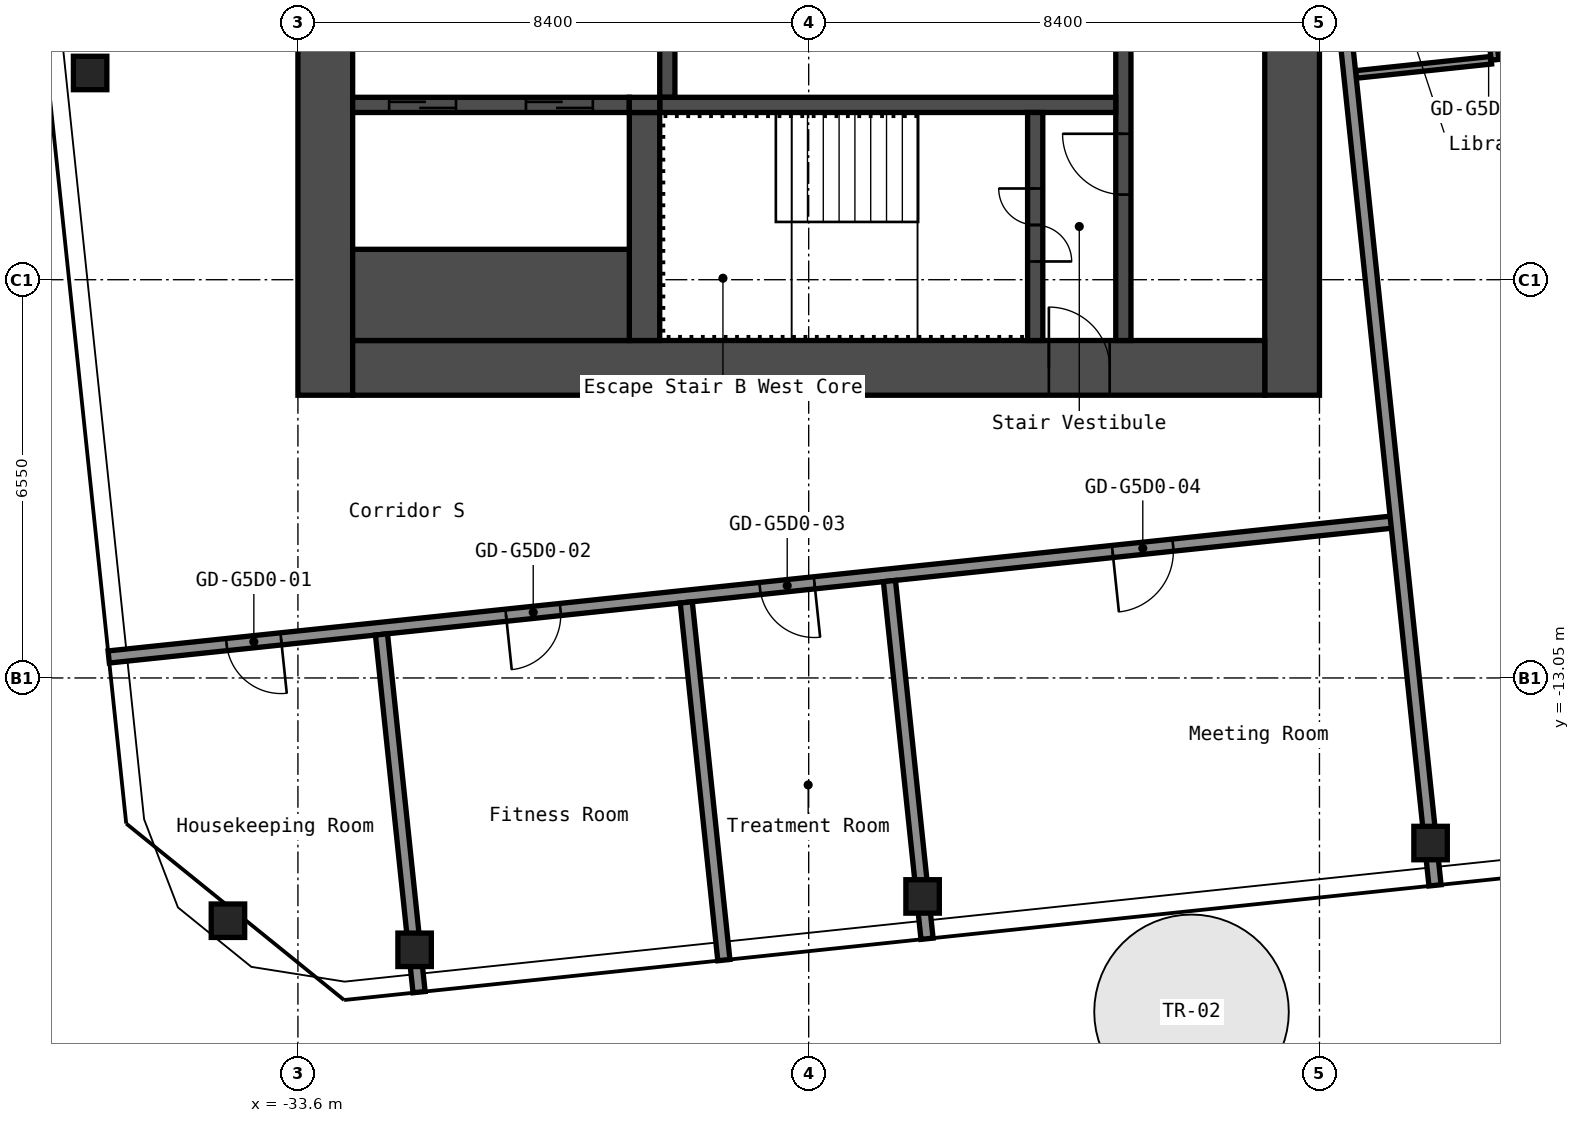
"""IFC4 building model, lengths in metres.
Left out: names, types, materials, properties, quantities, classifications, styles, units other than length and angle.
Written with IfcOpenShell. Run it as: python <this file> out.ifc"""

import sys

from ifc_helpers import new_model, si_unit, direction, frame, frame_2d, origin, origin_2d, place, context, subcontext, project, spatial, rectangle, hollow_rectangle, extrude, element, fill, save


model = new_model("IFC4")
c1 = context("Model", 3, precision=1e-05, world=origin(), true_north=direction((0.0, 1.0)))
c2 = subcontext(c1, "Body", "Model", "MODEL_VIEW")
j1 = project(units=[si_unit("LENGTHUNIT", "METRE"), si_unit("PLANEANGLEUNIT", "RADIAN")], contexts=[c1])
p1 = place(None, origin())
s1 = spatial("IfcSite", under=j1, at=p1, CompositionType="ELEMENT")
p2 = place(p1, origin())
s2 = spatial("IfcBuilding", under=s1, at=p2, CompositionType="ELEMENT")
p3 = place(p2, frame((0.0, 0.0, 248.6)))
s3 = spatial("IfcBuildingStorey", under=s2, at=p3, CompositionType="ELEMENT", Elevation=248.6)
for number, where, z_axis, x_axis in (
    (1, (-34.751, -17.042, 0.0), (0.0, 0.0, 1.0), (1.0, 0.0, 0.0)),
    (2, (-37.017, -3.1, 0.0), (0.0, 0.0, 1.0), (1.0, 0.0, 0.0)),
    (3, (-31.681, -17.521, 0.0), (0.0, 0.0, 1.0), (1.0, 0.0, 0.0)),
    (4, (-23.327, -16.643, 0.0), (0.0, 0.0, 1.0), (1.0, 0.0, 0.0)),
    (5, (-14.973, -15.765, 0.0), (0.0, 0.0, 1.0), (1.0, 0.0, 0.0)),
):
    element("IfcColumn", number, at=place(p3, frame(where, z_axis=z_axis, x_axis=x_axis)), inside=s3, PredefinedType="COLUMN", context=c2, shape_type="SweptSolid", body=[
        extrude(hollow_rectangle(XDim=0.55, YDim=0.55, WallThickness=0.022, InnerFilletRadius=0.033, OuterFilletRadius=0.055, at=origin_2d()), origin(), (0.0, 0.0, 1.0), 2.75),
    ])
p4 = place(p3, frame((-17.25, -8.4, 0.0), z_axis=(0.0, 0.0, 1.0), x_axis=(0.0, 1.0, 0.0)))
e6 = element("IfcWall", 6, at=p4, inside=s3, PredefinedType="SHEAR", context=c2, shape_type="SweptSolid", body=[
    extrude(rectangle(XDim=16.8, YDim=0.9, at=frame_2d((8.4, 0.0))), origin(), (0.0, 0.0, 1.0), 2.75),
])
p5 = place(p4, frame((8.321, 0.0, 0.0)))
e7 = element("IfcOpeningElement", 7, at=p5, cuts=e6, PredefinedType="OPENING", context=c2, shape_type="SweptSolid", body=[
    extrude(rectangle(XDim=1.6, YDim=2.1, at=frame_2d((0.8, 1.05))), frame((0.0, 0.46, 0.0), z_axis=(0.0, -1.0, 0.0), x_axis=(1.0, 0.0, 0.0)), (0.0, 0.0, 1.0), 0.92),
])
p6 = place(p3, frame((-33.15, -8.4, 0.0), z_axis=(0.0, 0.0, 1.0), x_axis=(0.0, 1.0, 0.0)))
e8 = element("IfcWall", 8, at=p6, inside=s3, PredefinedType="SHEAR", context=c2, shape_type="SweptSolid", body=[
    extrude(rectangle(XDim=16.8, YDim=0.9, at=frame_2d((8.4, 0.0))), origin(), (0.0, 0.0, 1.0), 2.75),
])
p7 = place(p3, frame((-32.7, -7.95, 0.0), z_axis=(0.0, 0.0, 1.0), x_axis=(1.0, 0.0, 0.0)))
e9 = element("IfcWall", 9, at=p7, inside=s3, PredefinedType="SHEAR", context=c2, shape_type="SweptSolid", body=[
    extrude(rectangle(XDim=15.0, YDim=0.9, at=frame_2d((7.5, 0.0))), origin(), (0.0, 0.0, 1.0), 2.75),
])
p8 = place(p7, frame((11.45, 0.0, 0.0)))
e10 = element("IfcOpeningElement", 10, at=p8, cuts=e9, PredefinedType="OPENING", context=c2, shape_type="SweptSolid", body=[
    extrude(rectangle(XDim=1.0, YDim=2.1, at=frame_2d((0.5, 1.05))), frame((0.0, 0.46, 0.0), z_axis=(0.0, -1.0, 0.0), x_axis=(1.0, 0.0, 0.0)), (0.0, 0.0, 1.0), 0.92),
])
p9 = place(p3, frame((-20.025, -7.5, 0.0), z_axis=(0.0, 0.0, 1.0), x_axis=(0.0, 1.0, 0.0)))
e11 = element("IfcWall", 11, at=p9, inside=s3, PredefinedType="SHEAR", context=c2, shape_type="SweptSolid", body=[
    extrude(rectangle(XDim=6.3, YDim=0.25, at=frame_2d((3.15, 0.0))), origin(), (0.0, 0.0, 1.0), 2.75),
])
p10 = place(p9, frame((2.4, 0.0, 0.0)))
e12 = element("IfcOpeningElement", 12, at=p10, cuts=e11, PredefinedType="OPENING", context=c2, shape_type="SweptSolid", body=[
    extrude(rectangle(XDim=1.0, YDim=2.1, at=frame_2d((0.5, 1.05))), frame((0.0, 0.135, 0.0), z_axis=(0.0, -1.0, 0.0), x_axis=(1.0, 0.0, 0.0)), (0.0, 0.0, 1.0), 0.27),
])
p11 = place(p3, frame((-27.525, -3.5, 0.0), z_axis=(0.0, 0.0, 1.0), x_axis=(0.0, 1.0, 0.0)))
e13 = element("IfcWall", 13, at=p11, inside=s3, PredefinedType="SHEAR", context=c2, shape_type="SweptSolid", body=[
    extrude(rectangle(XDim=2.05, YDim=0.25, at=frame_2d((1.025, 0.0))), origin(), (0.0, 0.0, 1.0), 2.75),
])
p12 = place(p3, frame((-27.65, -3.625, 0.0), z_axis=(0.0, 0.0, 1.0), x_axis=(1.0, 0.0, 0.0)))
e14 = element("IfcWall", 14, at=p12, inside=s3, PredefinedType="SHEAR", context=c2, shape_type="SweptSolid", body=[
    extrude(rectangle(XDim=7.5, YDim=0.25, at=frame_2d((3.75, 0.0))), origin(), (0.0, 0.0, 1.0), 2.75),
])
p13 = place(p3, frame((-21.475, -7.5, 0.0), z_axis=(0.0, 0.0, 1.0), x_axis=(0.0, 1.0, 0.0)))
e15 = element("IfcWall", 15, at=p13, inside=s3, PredefinedType="SHEAR", context=c2, shape_type="SweptSolid", body=[
    extrude(rectangle(XDim=3.75, YDim=0.25, at=frame_2d((1.875, 0.0))), origin(), (0.0, 0.0, 1.0), 2.75),
])
p14 = place(p13, frame((1.3, 0.0, 0.0)))
e16 = element("IfcOpeningElement", 16, at=p14, cuts=e15, PredefinedType="OPENING", context=c2, shape_type="SweptSolid", body=[
    extrude(rectangle(XDim=1.2, YDim=2.1, at=frame_2d((0.6, 1.05))), frame((0.0, 0.135, 0.0), z_axis=(0.0, -1.0, 0.0), x_axis=(1.0, 0.0, 0.0)), (0.0, 0.0, 1.0), 0.27),
])
p15 = place(p3, frame((-27.9, -7.5, 0.0), z_axis=(0.0, 0.0, 1.0), x_axis=(0.0, 1.0, 0.0)))
e17 = element("IfcWall", 17, at=p15, inside=s3, PredefinedType="SHEAR", context=c2, shape_type="SweptSolid", body=[
    extrude(rectangle(XDim=3.75, YDim=0.5, at=frame_2d((1.875, 0.0))), origin(), (0.0, 0.0, 1.0), 2.75),
])
p16 = place(p3, frame((-32.7, -3.625, 0.0), z_axis=(0.0, 0.0, 1.0), x_axis=(1.0, 0.0, 0.0)))
e18 = element("IfcWall", 18, at=p16, inside=s3, PredefinedType="SHEAR", context=c2, shape_type="SweptSolid", body=[
    extrude(rectangle(XDim=4.55, YDim=0.25, at=frame_2d((2.275, 0.0))), origin(), (0.0, 0.0, 1.0), 2.75),
])
p17 = place(p16, frame((2.85, 0.0, 0.0)))
e19 = element("IfcOpeningElement", 19, at=p17, cuts=e18, PredefinedType="OPENING", context=c2, shape_type="SweptSolid", body=[
    extrude(rectangle(XDim=1.1, YDim=2.1, at=frame_2d((0.55, 1.05))), frame((0.0, 0.135, 0.0), z_axis=(0.0, -1.0, 0.0), x_axis=(1.0, 0.0, 0.0)), (0.0, 0.0, 1.0), 0.27),
])
p18 = place(p16, frame((0.6, 0.0, 0.0)))
e20 = element("IfcOpeningElement", 20, at=p18, cuts=e18, PredefinedType="OPENING", context=c2, shape_type="SweptSolid", body=[
    extrude(rectangle(XDim=1.1, YDim=2.1, at=frame_2d((0.55, 1.05))), frame((0.0, 0.135, 0.0), z_axis=(0.0, -1.0, 0.0), x_axis=(1.0, 0.0, 0.0)), (0.0, 0.0, 1.0), 0.27),
])
p19 = place(p3, frame((-32.7, -6.75, 0.0), z_axis=(0.0, 0.0, 1.0), x_axis=(1.0, 0.0, 0.0)))
e21 = element("IfcWall", 21, at=p19, inside=s3, PredefinedType="SHEAR", context=c2, shape_type="SweptSolid", body=[
    extrude(rectangle(XDim=4.55, YDim=1.5, at=frame_2d((2.275, 0.0))), origin(), (0.0, 0.0, 1.0), 2.75),
])
p20 = place(p3, frame((-28.15, -3.625, 0.0), z_axis=(0.0, 0.0, 1.0), x_axis=(1.0, 0.0, 0.0)))
e22 = element("IfcWall", 22, at=p20, inside=s3, PredefinedType="SHEAR", context=c2, shape_type="SweptSolid", body=[
    extrude(rectangle(XDim=0.5, YDim=0.25, at=frame_2d((0.25, 0.0))), origin(), (0.0, 0.0, 1.0), 2.75),
])
p21 = place(p3, frame((-36.712, -12.705, 0.0), z_axis=(0.0, 0.0, 1.0), x_axis=(0.994522460242, 0.104523088709, 0.0)))
e23 = element("IfcWall", 23, at=p21, inside=s3, PredefinedType="PARTITIONING", context=c2, shape_type="SweptSolid", body=[
    extrude(rectangle(XDim=21.3, YDim=0.2, at=frame_2d((10.65, 0.0))), origin(), (0.0, 0.0, 1.0), 2.75),
])
p22 = place(p21, frame((1.95, 0.0, 0.0)))
e24 = element("IfcOpeningElement", 24, at=p22, cuts=e23, PredefinedType="OPENING", context=c2, shape_type="SweptSolid", body=[
    extrude(rectangle(XDim=0.9, YDim=2.1, at=frame_2d((0.45, 1.05))), frame((0.0, 0.11, 0.0), z_axis=(0.0, -1.0, 0.0), x_axis=(1.0, 0.0, 0.0)), (0.0, 0.0, 1.0), 0.22),
])
p23 = place(p21, frame((6.57, 0.0, 0.0)))
e25 = element("IfcOpeningElement", 25, at=p23, cuts=e23, PredefinedType="OPENING", context=c2, shape_type="SweptSolid", body=[
    extrude(rectangle(XDim=0.9, YDim=2.1, at=frame_2d((0.45, 1.05))), frame((0.0, 0.11, 0.0), z_axis=(0.0, -1.0, 0.0), x_axis=(1.0, 0.0, 0.0)), (0.0, 0.0, 1.0), 0.22),
])
p24 = place(p21, frame((10.77, 0.0, 0.0)))
e26 = element("IfcOpeningElement", 26, at=p24, cuts=e23, PredefinedType="OPENING", context=c2, shape_type="SweptSolid", body=[
    extrude(rectangle(XDim=0.9, YDim=2.1, at=frame_2d((0.45, 1.05))), frame((0.0, 0.11, 0.0), z_axis=(0.0, -1.0, 0.0), x_axis=(1.0, 0.0, 0.0)), (0.0, 0.0, 1.0), 0.22),
])
p25 = place(p21, frame((16.6, 0.0, 0.0)))
e27 = element("IfcOpeningElement", 27, at=p25, cuts=e23, PredefinedType="OPENING", context=c2, shape_type="SweptSolid", body=[
    extrude(rectangle(XDim=1.0, YDim=2.1, at=frame_2d((0.5, 1.05))), frame((0.0, 0.11, 0.0), z_axis=(0.0, -1.0, 0.0), x_axis=(1.0, 0.0, 0.0)), (0.0, 0.0, 1.0), 0.22),
])
p26 = place(p3, frame((-16.201, -3.124, 0.0), z_axis=(0.0, 0.0, 1.0), x_axis=(0.99452218011, 0.104525754092, 0.0)))
e28 = element("IfcWall", 28, at=p26, inside=s3, PredefinedType="PARTITIONING", context=c2, shape_type="SweptSolid", body=[
    extrude(rectangle(XDim=2.238, YDim=0.125, at=frame_2d((1.119, 0.0))), origin(), (0.0, 0.0, 1.0), 2.75),
])
p27 = place(p3, frame((-31.608, -18.217, 0.0), z_axis=(0.0, 0.0, 1.0), x_axis=(-0.10453655107, 0.994521045273, 0.0)))
e29 = element("IfcWall", 29, at=p27, inside=s3, PredefinedType="PARTITIONING", context=c2, shape_type="SweptSolid", body=[
    extrude(rectangle(XDim=5.916, YDim=0.2, at=frame_2d((2.958, 0.0))), origin(), (0.0, 0.0, 1.0), 2.75),
])
p28 = place(p3, frame((-26.595, -17.691, 0.0), z_axis=(0.0, 0.0, 1.0), x_axis=(-0.104532260673, 0.994521496238, 0.0)))
e30 = element("IfcWall", 30, at=p28, inside=s3, PredefinedType="PARTITIONING", context=c2, shape_type="SweptSolid", body=[
    extrude(rectangle(XDim=5.916, YDim=0.2, at=frame_2d((2.958, 0.0))), origin(), (0.0, 0.0, 1.0), 2.75),
])
p29 = place(p3, frame((-23.254, -17.339, 0.0), z_axis=(0.0, 0.0, 1.0), x_axis=(-0.10453655107, 0.994521045273, 0.0)))
e31 = element("IfcWall", 31, at=p29, inside=s3, PredefinedType="PARTITIONING", context=c2, shape_type="SweptSolid", body=[
    extrude(rectangle(XDim=5.916, YDim=0.2, at=frame_2d((2.958, 0.0))), origin(), (0.0, 0.0, 1.0), 2.75),
])
p30 = place(p3, frame((-14.9, -16.461, 0.0), z_axis=(0.0, 0.0, 1.0), x_axis=(-0.104523729364, 0.99452239291, 0.0)))
e32 = element("IfcWall", 32, at=p30, inside=s3, PredefinedType="PARTITIONING", context=c2, shape_type="SweptSolid", body=[
    extrude(rectangle(XDim=15.308, YDim=0.2, at=frame_2d((7.654, 0.0))), origin(), (0.0, 0.0, 1.0), 2.75),
])
p31 = place(p3, frame((-13.914, -2.884, 0.0), z_axis=(0.0, 0.0, 1.0), x_axis=(-0.104491611519, 0.994525767953, 0.0)))
e33 = element("IfcWall", 33, at=p31, inside=s3, PredefinedType="PARTITIONING", context=c2, shape_type="SweptSolid", body=[
    extrude(rectangle(XDim=2.5, YDim=0.125, at=frame_2d((1.25, 0.0))), origin(), (0.0, 0.0, 1.0), 2.75),
])
p32 = place(p31, frame((0.55, 0.0, 0.0)))
e34 = element("IfcOpeningElement", 34, at=p32, cuts=e33, PredefinedType="OPENING", context=c2, shape_type="SweptSolid", body=[
    extrude(rectangle(XDim=0.9, YDim=2.1, at=frame_2d((0.45, 1.05))), frame((0.0, 0.073, 0.0), z_axis=(0.0, -1.0, 0.0), x_axis=(1.0, 0.0, 0.0)), (0.0, 0.0, 1.0), 0.145),
])
p33 = place(p8, origin())
e35 = element("IfcDoor", 35, at=p33, inside=s3, OperationType="SINGLE_SWING_RIGHT", PredefinedType="DOOR", context=c2, shape_type="SweptSolid", body=[
    extrude(rectangle(XDim=1.0, YDim=2.1, at=frame_2d((0.5, 1.05))), frame((0.0, 0.025, 0.0), z_axis=(0.0, -1.0, 0.0), x_axis=(1.0, 0.0, 0.0)), (0.0, 0.0, 1.0), 0.05),
])
fill(e10, e35)
p34 = place(p14, origin())
e36 = element("IfcDoor", 36, at=p34, inside=s3, OperationType="DOUBLE_DOOR_SINGLE_SWING", PredefinedType="DOOR", context=c2, shape_type="SweptSolid", body=[
    extrude(rectangle(XDim=1.2, YDim=2.1, at=frame_2d((0.6, 1.05))), frame((0.0, 0.025, 0.0), z_axis=(0.0, -1.0, 0.0), x_axis=(1.0, 0.0, 0.0)), (0.0, 0.0, 1.0), 0.05),
])
fill(e16, e36)
p35 = place(p10, origin())
e37 = element("IfcDoor", 37, at=p35, inside=s3, OperationType="SINGLE_SWING_LEFT", PredefinedType="DOOR", context=c2, shape_type="SweptSolid", body=[
    extrude(rectangle(XDim=1.0, YDim=2.1, at=frame_2d((0.5, 1.05))), frame((0.0, 0.025, 0.0), z_axis=(0.0, -1.0, 0.0), x_axis=(1.0, 0.0, 0.0)), (0.0, 0.0, 1.0), 0.05),
])
fill(e12, e37)
p36 = place(p17, origin())
e38 = element("IfcDoor", 38, at=p36, inside=s3, OperationType="DOUBLE_DOOR_SLIDING", PredefinedType="DOOR", context=c2, shape_type="SweptSolid", body=[
    extrude(rectangle(XDim=1.1, YDim=2.1, at=frame_2d((0.55, 1.05))), frame((0.0, 0.025, 0.0), z_axis=(0.0, -1.0, 0.0), x_axis=(1.0, 0.0, 0.0)), (0.0, 0.0, 1.0), 0.05),
])
fill(e19, e38)
p37 = place(p18, origin())
e39 = element("IfcDoor", 39, at=p37, inside=s3, OperationType="DOUBLE_DOOR_SLIDING", PredefinedType="DOOR", context=c2, shape_type="SweptSolid", body=[
    extrude(rectangle(XDim=1.1, YDim=2.1, at=frame_2d((0.55, 1.05))), frame((0.0, 0.025, 0.0), z_axis=(0.0, -1.0, 0.0), x_axis=(1.0, 0.0, 0.0)), (0.0, 0.0, 1.0), 0.05),
])
fill(e20, e39)
p38 = place(p22, origin())
e40 = element("IfcDoor", 40, at=p38, inside=s3, OperationType="SINGLE_SWING_RIGHT", PredefinedType="DOOR", context=c2, shape_type="SweptSolid", body=[
    extrude(rectangle(XDim=0.9, YDim=2.1, at=frame_2d((0.45, 1.05))), frame((0.0, 0.025, 0.0), z_axis=(0.0, -1.0, 0.0), x_axis=(1.0, 0.0, 0.0)), (0.0, 0.0, 1.0), 0.05),
])
fill(e24, e40)
p39 = place(p23, origin())
e41 = element("IfcDoor", 41, at=p39, inside=s3, OperationType="SINGLE_SWING_LEFT", PredefinedType="DOOR", context=c2, shape_type="SweptSolid", body=[
    extrude(rectangle(XDim=0.9, YDim=2.1, at=frame_2d((0.45, 1.05))), frame((0.0, 0.025, 0.0), z_axis=(0.0, -1.0, 0.0), x_axis=(1.0, 0.0, 0.0)), (0.0, 0.0, 1.0), 0.05),
])
fill(e25, e41)
p40 = place(p24, origin())
e42 = element("IfcDoor", 42, at=p40, inside=s3, OperationType="SINGLE_SWING_RIGHT", PredefinedType="DOOR", context=c2, shape_type="SweptSolid", body=[
    extrude(rectangle(XDim=0.9, YDim=2.1, at=frame_2d((0.45, 1.05))), frame((0.0, 0.025, 0.0), z_axis=(0.0, -1.0, 0.0), x_axis=(1.0, 0.0, 0.0)), (0.0, 0.0, 1.0), 0.05),
])
fill(e26, e42)
p41 = place(p25, origin())
e43 = element("IfcDoor", 43, at=p41, inside=s3, OperationType="SINGLE_SWING_LEFT", PredefinedType="DOOR", context=c2, shape_type="SweptSolid", body=[
    extrude(rectangle(XDim=1.0, YDim=2.1, at=frame_2d((0.5, 1.05))), frame((0.0, 0.025, 0.0), z_axis=(0.0, -1.0, 0.0), x_axis=(1.0, 0.0, 0.0)), (0.0, 0.0, 1.0), 0.05),
])
fill(e27, e43)
save(model, sys.argv[1])
